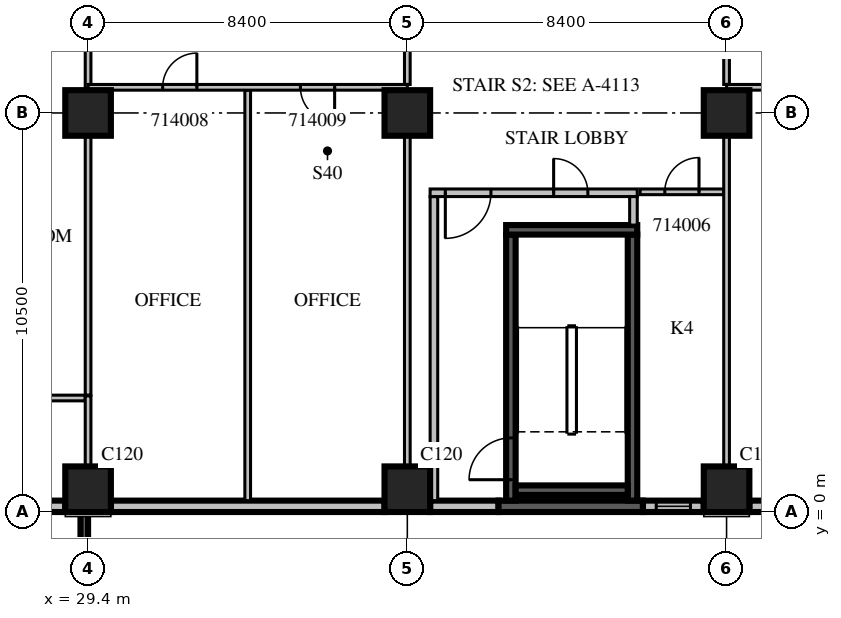
"""IFC4 building model, lengths in metres.
Left out: names, types, materials, properties, quantities, classifications, styles, units other than length and angle.
Written with IfcOpenShell. Run it as: python <this file> out.ifc"""

import sys

from ifc_helpers import new_model, si_unit, direction, frame, frame_2d, origin, origin_2d, place, context, subcontext, project, spatial, rectangle, extrude, source, transform, mapped, element, fill, save


model = new_model("IFC4")
c1 = context("Model", 3, precision=1e-05, world=origin(), true_north=direction((0.0, 1.0)))
c2 = subcontext(c1, "Body", "Model", "MODEL_VIEW")
j1 = project(units=[si_unit("LENGTHUNIT", "METRE"), si_unit("PLANEANGLEUNIT", "RADIAN")], contexts=[c1])
p1 = place(None, origin())
s1 = spatial("IfcSite", under=j1, at=p1, CompositionType="ELEMENT")
p2 = place(p1, origin())
s2 = spatial("IfcBuilding", under=s1, at=p2, CompositionType="ELEMENT")
p3 = place(p2, frame((0.0, 0.0, 69.9)))
s3 = spatial("IfcBuildingStorey", under=s2, at=p3, CompositionType="ELEMENT", Elevation=69.9)
m1 = source(origin(), c2, "Body", "SweptSolid", [
    extrude(rectangle(XDim=1.2, YDim=1.2, at=origin_2d()), origin(), (0.0, 0.0, 1.0), 4.2),
])
for number, where, z_axis, x_axis in (
    (1, (29.4, 0.6, 0.0), (0.0, 0.0, 1.0), (1.0, 0.0, 0.0)),
    (2, (37.8, 0.6, 0.0), (0.0, 0.0, 1.0), (1.0, 0.0, 0.0)),
    (3, (46.2, 0.6, 0.0), (0.0, 0.0, 1.0), (1.0, 0.0, 0.0)),
    (4, (29.4, 10.5, 0.0), (0.0, 0.0, 1.0), (1.0, 0.0, 0.0)),
    (5, (37.8, 10.5, 0.0), (0.0, 0.0, 1.0), (1.0, 0.0, 0.0)),
    (6, (46.2, 10.5, 0.0), (0.0, 0.0, 1.0), (1.0, 0.0, 0.0)),
):
    element("IfcColumn", number, at=place(p3, frame(where, z_axis=z_axis, x_axis=x_axis)), inside=s3, PredefinedType="COLUMN", context=c2, shape_type="MappedRepresentation", body=[
        mapped(m1, transform((0.0, 0.0, 0.0), scale=1.0)),
    ])
m2 = source(origin(), c2, "Body", "SweptSolid", [
    extrude(rectangle(XDim=3.9, YDim=0.2, at=frame_2d((1.95, 0.0))), origin(), (0.0, 0.0, 1.0), 3.8),
])
p4 = place(p3, frame((29.3, 0.0, 0.0), z_axis=(0.0, 0.0, 1.0), x_axis=(0.0, -1.0, 0.0)))
e7 = element("IfcWall", 7, at=p4, inside=s3, PredefinedType="SOLIDWALL", context=c2, shape_type="MappedRepresentation", body=[
    mapped(m2, transform((0.0, 0.0, 0.0), scale=1.0)),
])
m3 = source(origin(), c2, "Body", "SweptSolid", [
    extrude(rectangle(XDim=2.4, YDim=2.7, at=frame_2d((1.2, 1.35))), frame((0.0, 0.11, 0.0), z_axis=(0.0, -1.0, 0.0), x_axis=(1.0, 0.0, 0.0)), (0.0, 0.0, 1.0), 0.22),
])
p5 = place(p4, frame((0.75, 0.0, 0.6)))
e8 = element("IfcOpeningElement", 8, at=p5, cuts=e7, PredefinedType="OPENING", context=c2, shape_type="MappedRepresentation", body=[
    mapped(m3, transform((0.0, 0.0, 0.0), scale=1.0)),
])
m4 = source(origin(), c2, "Body", "SweptSolid", [
    extrude(rectangle(XDim=7.2, YDim=0.3, at=frame_2d((3.6, 0.0))), origin(), (0.0, 0.0, 1.0), 3.8),
])
p6 = place(p3, frame((21.6, 0.15, 0.0), z_axis=(0.0, 0.0, 1.0), x_axis=(1.0, 0.0, 0.0)))
e9 = element("IfcWall", 9, at=p6, inside=s3, PredefinedType="STANDARD", context=c2, shape_type="MappedRepresentation", body=[
    mapped(m4, transform((0.0, 0.0, 0.0), scale=1.0)),
])
m5 = source(origin(), c2, "Body", "SweptSolid", [
    extrude(rectangle(XDim=2.4, YDim=2.7, at=frame_2d((1.2, 1.35))), frame((0.0, 0.16, 0.0), z_axis=(0.0, -1.0, 0.0), x_axis=(1.0, 0.0, 0.0)), (0.0, 0.0, 1.0), 0.32),
])
p7 = place(p6, frame((0.3, 0.0, 0.6)))
e10 = element("IfcOpeningElement", 10, at=p7, cuts=e9, PredefinedType="OPENING", context=c2, shape_type="MappedRepresentation", body=[
    mapped(m5, transform((0.0, 0.0, 0.0), scale=1.0)),
])
m6 = source(origin(), c2, "Body", "SweptSolid", [
    extrude(rectangle(XDim=1.0, YDim=2.1, at=frame_2d((0.5, 1.05))), frame((0.0, 0.16, 0.0), z_axis=(0.0, -1.0, 0.0), x_axis=(1.0, 0.0, 0.0)), (0.0, 0.0, 1.0), 0.32),
])
p8 = place(p6, frame((5.2, 0.0, 0.0)))
e11 = element("IfcOpeningElement", 11, at=p8, cuts=e9, PredefinedType="OPENING", context=c2, shape_type="MappedRepresentation", body=[
    mapped(m6, transform((0.0, 0.0, 0.0), scale=1.0)),
])
p9 = place(p3, frame((30.0, 0.15, 0.0), z_axis=(0.0, 0.0, 1.0), x_axis=(1.0, 0.0, 0.0)))
e12 = element("IfcWall", 12, at=p9, inside=s3, PredefinedType="STANDARD", context=c2, shape_type="MappedRepresentation", body=[
    mapped(m4, transform((0.0, 0.0, 0.0), scale=1.0)),
])
m7 = source(origin(), c2, "Body", "SweptSolid", [
    extrude(rectangle(XDim=1.8, YDim=0.3, at=frame_2d((0.9, 0.0))), origin(), (0.0, 0.0, 1.0), 3.8),
])
p10 = place(p3, frame((38.4, 0.15, 0.0), z_axis=(0.0, 0.0, 1.0), x_axis=(1.0, 0.0, 0.0)))
e13 = element("IfcWall", 13, at=p10, inside=s3, PredefinedType="STANDARD", context=c2, shape_type="MappedRepresentation", body=[
    mapped(m7, transform((0.0, 0.0, 0.0), scale=1.0)),
])
m8 = source(origin(), c2, "Body", "SweptSolid", [
    extrude(rectangle(XDim=3.8, YDim=0.3, at=frame_2d((1.9, 0.0))), origin(), (0.0, 0.0, 1.0), 3.8),
])
p11 = place(p3, frame((40.2, 0.15, 0.0), z_axis=(0.0, 0.0, 1.0), x_axis=(1.0, 0.0, 0.0)))
e14 = element("IfcWall", 14, at=p11, inside=s3, PredefinedType="SOLIDWALL", context=c2, shape_type="MappedRepresentation", body=[
    mapped(m8, transform((0.0, 0.0, 0.0), scale=1.0)),
])
m9 = source(origin(), c2, "Body", "SweptSolid", [
    extrude(rectangle(XDim=1.6, YDim=0.3, at=frame_2d((0.8, 0.0))), origin(), (0.0, 0.0, 1.0), 3.8),
])
p12 = place(p3, frame((44.0, 0.15, 0.0), z_axis=(0.0, 0.0, 1.0), x_axis=(1.0, 0.0, 0.0)))
e15 = element("IfcWall", 15, at=p12, inside=s3, PredefinedType="STANDARD", context=c2, shape_type="MappedRepresentation", body=[
    mapped(m9, transform((0.0, 0.0, 0.0), scale=1.0)),
])
m10 = source(origin(), c2, "Body", "SweptSolid", [
    extrude(rectangle(XDim=0.9, YDim=2.7, at=frame_2d((0.45, 1.35))), frame((0.0, 0.16, 0.0), z_axis=(0.0, -1.0, 0.0), x_axis=(1.0, 0.0, 0.0)), (0.0, 0.0, 1.0), 0.32),
])
p13 = place(p12, frame((0.35, 0.0, 0.6)))
e16 = element("IfcOpeningElement", 16, at=p13, cuts=e15, PredefinedType="OPENING", context=c2, shape_type="MappedRepresentation", body=[
    mapped(m10, transform((0.0, 0.0, 0.0), scale=1.0)),
])
m11 = source(origin(), c2, "Body", "SweptSolid", [
    extrude(rectangle(XDim=4.68, YDim=0.3, at=frame_2d((2.34, 0.0))), origin(), (0.0, 0.0, 1.0), 3.3),
])
p14 = place(p3, frame((46.8, 0.15, 0.0), z_axis=(0.0, 0.0, 1.0), x_axis=(1.0, 0.0, 0.0)))
e17 = element("IfcWall", 17, at=p14, inside=s3, PredefinedType="STANDARD", context=c2, shape_type="MappedRepresentation", body=[
    mapped(m11, transform((0.0, 0.0, 0.0), scale=1.0)),
])
m12 = source(origin(), c2, "Body", "SweptSolid", [
    extrude(rectangle(XDim=3.6, YDim=2.7, at=frame_2d((1.8, 1.35))), frame((0.0, 0.16, 0.0), z_axis=(0.0, -1.0, 0.0), x_axis=(1.0, 0.0, 0.0)), (0.0, 0.0, 1.0), 0.32),
])
p15 = place(p14, frame((0.54, 0.0, 0.6)))
e18 = element("IfcOpeningElement", 18, at=p15, cuts=e17, PredefinedType="OPENING", context=c2, shape_type="MappedRepresentation", body=[
    mapped(m12, transform((0.0, 0.0, 0.0), scale=1.0)),
])
m13 = source(origin(), c2, "Body", "SweptSolid", [
    extrude(rectangle(XDim=7.0, YDim=0.25, at=frame_2d((3.5, 0.0))), origin(), (0.0, 0.0, 1.0), 3.8),
])
p16 = place(p3, frame((40.525, 0.3, 0.0), z_axis=(0.0, 0.0, 1.0), x_axis=(0.0, 1.0, 0.0)))
e19 = element("IfcWall", 19, at=p16, inside=s3, PredefinedType="SOLIDWALL", context=c2, shape_type="MappedRepresentation", body=[
    mapped(m13, transform((0.0, 0.0, 0.0), scale=1.0)),
])
m14 = source(origin(), c2, "Body", "SweptSolid", [
    extrude(rectangle(XDim=1.1, YDim=2.1, at=frame_2d((0.55, 1.05))), frame((0.0, 0.135, 0.0), z_axis=(0.0, -1.0, 0.0), x_axis=(1.0, 0.0, 0.0)), (0.0, 0.0, 1.0), 0.27),
])
p17 = place(p16, frame((0.55, 0.0, 0.0)))
e20 = element("IfcOpeningElement", 20, at=p17, cuts=e19, PredefinedType="OPENING", context=c2, shape_type="MappedRepresentation", body=[
    mapped(m14, transform((0.0, 0.0, 0.0), scale=1.0)),
])
p18 = place(p3, frame((43.725, 0.3, 0.0), z_axis=(0.0, 0.0, 1.0), x_axis=(0.0, 1.0, 0.0)))
e21 = element("IfcWall", 21, at=p18, inside=s3, PredefinedType="SOLIDWALL", context=c2, shape_type="MappedRepresentation", body=[
    mapped(m13, transform((0.0, 0.0, 0.0), scale=1.0)),
])
m15 = source(origin(), c2, "Body", "SweptSolid", [
    extrude(rectangle(XDim=3.45, YDim=0.25, at=frame_2d((1.725, 0.0))), origin(), (0.0, 0.0, 1.0), 3.8),
])
p19 = place(p3, frame((40.4, 7.425, 0.0), z_axis=(0.0, 0.0, 1.0), x_axis=(1.0, 0.0, 0.0)))
e22 = element("IfcWall", 22, at=p19, inside=s3, PredefinedType="SOLIDWALL", context=c2, shape_type="MappedRepresentation", body=[
    mapped(m15, transform((0.0, 0.0, 0.0), scale=1.0)),
])
m16 = source(origin(), c2, "Body", "SweptSolid", [
    extrude(rectangle(XDim=2.95, YDim=0.25, at=frame_2d((1.475, 0.0))), origin(), (0.0, 0.0, 1.0), 3.8),
])
p20 = place(p3, frame((40.65, 0.575, 0.0), z_axis=(0.0, 0.0, 1.0), x_axis=(1.0, 0.0, 0.0)))
e23 = element("IfcWall", 23, at=p20, inside=s3, PredefinedType="SOLIDWALL", context=c2, shape_type="MappedRepresentation", body=[
    mapped(m16, transform((0.0, 0.0, 0.0), scale=1.0)),
])
m17 = source(origin(), c2, "Body", "SweptSolid", [
    extrude(rectangle(XDim=8.0, YDim=0.2, at=frame_2d((4.0, 0.0))), origin(), (0.0, 0.0, 1.0), 3.8),
])
p21 = place(p3, frame((38.5, 0.3, 0.0), z_axis=(0.0, 0.0, 1.0), x_axis=(0.0, 1.0, 0.0)))
e24 = element("IfcWall", 24, at=p21, inside=s3, PredefinedType="PARTITIONING", context=c2, shape_type="MappedRepresentation", body=[
    mapped(m17, transform((0.0, 0.0, 0.0), scale=1.0)),
])
m18 = source(origin(), c2, "Body", "SweptSolid", [
    extrude(rectangle(XDim=5.45, YDim=0.2, at=frame_2d((2.725, 0.0))), origin(), (0.0, 0.0, 1.0), 3.8),
])
p22 = place(p3, frame((38.4, 8.4, 0.0), z_axis=(0.0, 0.0, 1.0), x_axis=(1.0, 0.0, 0.0)))
e25 = element("IfcWall", 25, at=p22, inside=s3, PredefinedType="PARTITIONING", context=c2, shape_type="MappedRepresentation", body=[
    mapped(m18, transform((0.0, 0.0, 0.0), scale=1.0)),
])
m19 = source(origin(), c2, "Body", "SweptSolid", [
    extrude(rectangle(XDim=1.2, YDim=2.1, at=frame_2d((0.6, 1.05))), frame((0.0, 0.11, 0.0), z_axis=(0.0, -1.0, 0.0), x_axis=(1.0, 0.0, 0.0)), (0.0, 0.0, 1.0), 0.22),
])
p23 = place(p22, frame((0.4, 0.0, 0.0)))
e26 = element("IfcOpeningElement", 26, at=p23, cuts=e25, PredefinedType="OPENING", context=c2, shape_type="MappedRepresentation", body=[
    mapped(m19, transform((0.0, 0.0, 0.0), scale=1.0)),
])
m20 = source(origin(), c2, "Body", "SweptSolid", [
    extrude(rectangle(XDim=0.9, YDim=2.1, at=frame_2d((0.45, 1.05))), frame((0.0, 0.11, 0.0), z_axis=(0.0, -1.0, 0.0), x_axis=(1.0, 0.0, 0.0)), (0.0, 0.0, 1.0), 0.22),
])
p24 = place(p22, frame((3.25, 0.0, 0.0)))
e27 = element("IfcOpeningElement", 27, at=p24, cuts=e25, PredefinedType="OPENING", context=c2, shape_type="MappedRepresentation", body=[
    mapped(m20, transform((0.0, 0.0, 0.0), scale=1.0)),
])
m21 = source(origin(), c2, "Body", "SweptSolid", [
    extrude(rectangle(XDim=0.75, YDim=0.2, at=frame_2d((0.375, 0.0))), origin(), (0.0, 0.0, 1.0), 3.8),
])
p25 = place(p3, frame((43.75, 7.55, 0.0), z_axis=(0.0, 0.0, 1.0), x_axis=(0.0, 1.0, 0.0)))
e28 = element("IfcWall", 28, at=p25, inside=s3, PredefinedType="PARTITIONING", context=c2, shape_type="MappedRepresentation", body=[
    mapped(m21, transform((0.0, 0.0, 0.0), scale=1.0)),
])
m22 = source(origin(), c2, "Body", "SweptSolid", [
    extrude(rectangle(XDim=6.826, YDim=0.15, at=frame_2d((3.413, 0.0))), origin(), (0.0, 0.0, 1.0), 3.8),
])
p26 = place(p3, frame((29.4, 3.075, 0.0), z_axis=(0.0, 0.0, 1.0), x_axis=(0.0, 1.0, 0.0)))
e29 = element("IfcWall", 29, at=p26, inside=s3, PredefinedType="PARTITIONING", context=c2, shape_type="MappedRepresentation", body=[
    mapped(m22, transform((0.0, 0.0, 0.0), scale=1.0)),
])
m23 = source(origin(), c2, "Body", "SweptSolid", [
    extrude(rectangle(XDim=3.901, YDim=0.15, at=frame_2d((1.95, 0.0))), origin(), (0.0, 0.0, 1.0), 3.8),
])
p27 = place(p3, frame((29.4, 11.099, 0.0), z_axis=(0.0, 0.0, 1.0), x_axis=(0.0, 1.0, 0.0)))
e30 = element("IfcWall", 30, at=p27, inside=s3, PredefinedType="PARTITIONING", context=c2, shape_type="MappedRepresentation", body=[
    mapped(m23, transform((0.0, 0.0, 0.0), scale=1.0)),
])
m24 = source(origin(), c2, "Body", "SweptSolid", [
    extrude(rectangle(XDim=7.125, YDim=0.15, at=frame_2d((3.562, 0.0))), origin(), (0.0, 0.0, 1.0), 3.8),
])
p28 = place(p3, frame((22.2, 3.0, 0.0), z_axis=(0.0, 0.0, 1.0), x_axis=(1.0, 0.0, 0.0)))
e31 = element("IfcWall", 31, at=p28, inside=s3, PredefinedType="PARTITIONING", context=c2, shape_type="MappedRepresentation", body=[
    mapped(m24, transform((0.0, 0.0, 0.0), scale=1.0)),
])
m25 = source(origin(), c2, "Body", "SweptSolid", [
    extrude(rectangle(XDim=1.0, YDim=2.1, at=frame_2d((0.5, 1.05))), frame((0.0, 0.085, 0.0), z_axis=(0.0, -1.0, 0.0), x_axis=(1.0, 0.0, 0.0)), (0.0, 0.0, 1.0), 0.17),
])
p29 = place(p28, frame((3.1, 0.0, 0.0)))
e32 = element("IfcOpeningElement", 32, at=p29, cuts=e31, PredefinedType="OPENING", context=c2, shape_type="MappedRepresentation", body=[
    mapped(m25, transform((0.0, 0.0, 0.0), scale=1.0)),
])
m26 = source(origin(), c2, "Body", "SweptSolid", [
    extrude(rectangle(XDim=0.9, YDim=2.1, at=frame_2d((0.45, 1.05))), frame((0.0, 0.085, 0.0), z_axis=(0.0, -1.0, 0.0), x_axis=(1.0, 0.0, 0.0)), (0.0, 0.0, 1.0), 0.17),
])
p30 = place(p28, frame((4.162, 0.0, 0.0)))
e33 = element("IfcOpeningElement", 33, at=p30, cuts=e31, PredefinedType="OPENING", context=c2, shape_type="MappedRepresentation", body=[
    mapped(m26, transform((0.0, 0.0, 0.0), scale=1.0)),
])
m27 = source(origin(), c2, "Body", "SweptSolid", [
    extrude(rectangle(XDim=2.2, YDim=0.15, at=frame_2d((1.1, 0.0))), origin(), (0.0, 0.0, 1.0), 3.8),
])
p31 = place(p3, frame((46.125, 8.425, 0.0), z_axis=(0.0, 0.0, 1.0), x_axis=(-1.0, 0.0, 0.0)))
e34 = element("IfcWall", 34, at=p31, inside=s3, PredefinedType="PARTITIONING", context=c2, shape_type="MappedRepresentation", body=[
    mapped(m27, transform((0.0, 0.0, 0.0), scale=1.0)),
])
p32 = place(p31, frame((0.65, 0.0, 0.0)))
e35 = element("IfcOpeningElement", 35, at=p32, cuts=e34, PredefinedType="OPENING", context=c2, shape_type="MappedRepresentation", body=[
    mapped(m26, transform((0.0, 0.0, 0.0), scale=1.0)),
])
m28 = source(origin(), c2, "Body", "SweptSolid", [
    extrude(rectangle(XDim=10.8, YDim=0.15, at=frame_2d((5.4, 0.0))), origin(), (0.0, 0.0, 1.0), 3.8),
])
p33 = place(p3, frame((33.6, 0.3, 0.0), z_axis=(0.0, 0.0, 1.0), x_axis=(0.0, 1.0, 0.0)))
e36 = element("IfcWall", 36, at=p33, inside=s3, PredefinedType="PARTITIONING", context=c2, shape_type="MappedRepresentation", body=[
    mapped(m28, transform((0.0, 0.0, 0.0), scale=1.0)),
])
m29 = source(origin(), c2, "Body", "SweptSolid", [
    extrude(rectangle(XDim=1.856, YDim=0.15, at=frame_2d((0.928, 0.0))), origin(), (0.0, 0.0, 1.0), 3.8),
])
p34 = place(p3, frame((29.4, 1.199, 0.0), z_axis=(0.0, 0.0, 1.0), x_axis=(0.0, 1.0, 0.0)))
e37 = element("IfcWall", 37, at=p34, inside=s3, PredefinedType="PARTITIONING", context=c2, shape_type="MappedRepresentation", body=[
    mapped(m29, transform((0.0, 0.0, 0.0), scale=1.0)),
])
m30 = source(origin(), c2, "Body", "SweptSolid", [
    extrude(rectangle(XDim=8.702, YDim=0.15, at=frame_2d((4.351, 0.0))), origin(), (0.0, 0.0, 1.0), 3.8),
])
p35 = place(p3, frame((37.8, 1.199, 0.0), z_axis=(0.0, 0.0, 1.0), x_axis=(0.0, 1.0, 0.0)))
e38 = element("IfcWall", 38, at=p35, inside=s3, PredefinedType="PARTITIONING", context=c2, shape_type="MappedRepresentation", body=[
    mapped(m30, transform((0.0, 0.0, 0.0), scale=1.0)),
])
m31 = source(origin(), c2, "Body", "SweptSolid", [
    extrude(rectangle(XDim=3.75, YDim=0.15, at=frame_2d((1.875, 0.0))), origin(), (0.0, 0.0, 1.0), 3.8),
])
p36 = place(p3, frame((37.8, 11.25, 0.0), z_axis=(0.0, 0.0, 1.0), x_axis=(0.0, 1.0, 0.0)))
e39 = element("IfcWall", 39, at=p36, inside=s3, PredefinedType="PARTITIONING", context=c2, shape_type="MappedRepresentation", body=[
    mapped(m31, transform((0.0, 0.0, 0.0), scale=1.0)),
])
m32 = source(origin(), c2, "Body", "SweptSolid", [
    extrude(rectangle(XDim=8.4, YDim=0.15, at=frame_2d((4.2, 0.0))), origin(), (0.0, 0.0, 1.0), 3.8),
])
p37 = place(p3, frame((37.8, 11.175, 0.0), z_axis=(0.0, 0.0, 1.0), x_axis=(-1.0, 0.0, 0.0)))
e40 = element("IfcWall", 40, at=p37, inside=s3, PredefinedType="PARTITIONING", context=c2, shape_type="MappedRepresentation", body=[
    mapped(m32, transform((0.0, 0.0, 0.0), scale=1.0)),
])
p38 = place(p37, frame((5.537, 0.0, 0.0)))
e41 = element("IfcOpeningElement", 41, at=p38, cuts=e40, PredefinedType="OPENING", context=c2, shape_type="MappedRepresentation", body=[
    mapped(m26, transform((0.0, 0.0, 0.0), scale=1.0)),
])
p39 = place(p37, frame((1.913, 0.0, 0.0)))
e42 = element("IfcOpeningElement", 42, at=p39, cuts=e40, PredefinedType="OPENING", context=c2, shape_type="MappedRepresentation", body=[
    mapped(m26, transform((0.0, 0.0, 0.0), scale=1.0)),
])
p40 = place(p3, frame((46.2, 1.199, 0.0), z_axis=(0.0, 0.0, 1.0), x_axis=(0.0, 1.0, 0.0)))
e43 = element("IfcWall", 43, at=p40, inside=s3, PredefinedType="PARTITIONING", context=c2, shape_type="MappedRepresentation", body=[
    mapped(m30, transform((0.0, 0.0, 0.0), scale=1.0)),
])
p41 = place(p3, frame((46.2, 11.25, 0.0), z_axis=(0.0, 0.0, 1.0), x_axis=(0.0, 1.0, 0.0)))
e44 = element("IfcWall", 44, at=p41, inside=s3, PredefinedType="PARTITIONING", context=c2, shape_type="MappedRepresentation", body=[
    mapped(m31, transform((0.0, 0.0, 0.0), scale=1.0)),
])
m33 = source(origin(), c2, "Body", "SweptSolid", [
    extrude(rectangle(XDim=24.9, YDim=0.15, at=frame_2d((12.45, 0.0))), origin(), (0.0, 0.0, 1.0), 3.3),
])
p42 = place(p3, frame((71.1, 11.175, 0.0), z_axis=(0.0, 0.0, 1.0), x_axis=(-1.0, 0.0, 0.0)))
e45 = element("IfcWall", 45, at=p42, inside=s3, PredefinedType="PARTITIONING", context=c2, shape_type="MappedRepresentation", body=[
    mapped(m33, transform((0.0, 0.0, 0.0), scale=1.0)),
])
m34 = source(origin(), c2, "Body", "SweptSolid", [
    extrude(rectangle(XDim=1.1, YDim=2.1, at=frame_2d((0.55, 1.05))), frame((0.0, 0.085, 0.0), z_axis=(0.0, -1.0, 0.0), x_axis=(1.0, 0.0, 0.0)), (0.0, 0.0, 1.0), 0.17),
])
p43 = place(p42, frame((20.017, 0.0, 0.0)))
e46 = element("IfcOpeningElement", 46, at=p43, cuts=e45, PredefinedType="OPENING", context=c2, shape_type="MappedRepresentation", body=[
    mapped(m34, transform((0.0, 0.0, 0.0), scale=1.0)),
])
p44 = place(p42, frame((16.481, 0.0, 0.0)))
e47 = element("IfcOpeningElement", 47, at=p44, cuts=e45, PredefinedType="OPENING", context=c2, shape_type="MappedRepresentation", body=[
    mapped(m34, transform((0.0, 0.0, 0.0), scale=1.0)),
])
p45 = place(p42, frame((4.607, 0.0, 0.0)))
e48 = element("IfcOpeningElement", 48, at=p45, cuts=e45, PredefinedType="OPENING", context=c2, shape_type="MappedRepresentation", body=[
    mapped(m26, transform((0.0, 0.0, 0.0), scale=1.0)),
])
p46 = place(p42, frame((2.243, 0.0, 0.0)))
e49 = element("IfcOpeningElement", 49, at=p46, cuts=e45, PredefinedType="OPENING", context=c2, shape_type="MappedRepresentation", body=[
    mapped(m26, transform((0.0, 0.0, 0.0), scale=1.0)),
])
m35 = source(origin(), c2, "Body", "SweptSolid", [
    extrude(rectangle(XDim=0.9, YDim=2.7, at=frame_2d((0.45, 1.35))), frame((0.0, 0.03, 0.0), z_axis=(0.0, -1.0, 0.0), x_axis=(1.0, 0.0, 0.0)), (0.0, 0.0, 1.0), 0.06),
])
p47 = place(p13, origin())
e50 = element("IfcWindow", 50, at=p47, inside=s3, PartitioningType="SINGLE_PANEL", PredefinedType="WINDOW", context=c2, shape_type="MappedRepresentation", body=[
    mapped(m35, transform((0.0, 0.0, 0.0), scale=1.0)),
])
fill(e16, e50)
m36 = source(origin(), c2, "Body", "SweptSolid", [
    extrude(rectangle(XDim=1.1, YDim=2.1, at=frame_2d((0.55, 1.05))), frame((0.0, 0.025, 0.0), z_axis=(0.0, -1.0, 0.0), x_axis=(1.0, 0.0, 0.0)), (0.0, 0.0, 1.0), 0.05),
])
p48 = place(p17, origin())
e51 = element("IfcDoor", 51, at=p48, inside=s3, OperationType="SINGLE_SWING_LEFT", PredefinedType="DOOR", context=c2, shape_type="MappedRepresentation", body=[
    mapped(m36, transform((0.0, 0.0, 0.0), scale=1.0)),
])
fill(e20, e51)
m37 = source(origin(), c2, "Body", "SweptSolid", [
    extrude(rectangle(XDim=1.2, YDim=2.1, at=frame_2d((0.6, 1.05))), frame((0.0, 0.025, 0.0), z_axis=(0.0, -1.0, 0.0), x_axis=(1.0, 0.0, 0.0)), (0.0, 0.0, 1.0), 0.05),
])
p49 = place(p23, origin())
e52 = element("IfcDoor", 52, at=p49, inside=s3, OperationType="SINGLE_SWING_RIGHT", PredefinedType="DOOR", context=c2, shape_type="MappedRepresentation", body=[
    mapped(m37, transform((0.0, 0.0, 0.0), scale=1.0)),
])
fill(e26, e52)
m38 = source(origin(), c2, "Body", "SweptSolid", [
    extrude(rectangle(XDim=0.9, YDim=2.1, at=frame_2d((0.45, 1.05))), frame((0.0, 0.025, 0.0), z_axis=(0.0, -1.0, 0.0), x_axis=(1.0, 0.0, 0.0)), (0.0, 0.0, 1.0), 0.05),
])
p50 = place(p24, origin())
e53 = element("IfcDoor", 53, at=p50, inside=s3, OperationType="SINGLE_SWING_LEFT", PredefinedType="DOOR", context=c2, shape_type="MappedRepresentation", body=[
    mapped(m38, transform((0.0, 0.0, 0.0), scale=1.0)),
])
fill(e27, e53)
p51 = place(p32, origin())
e54 = element("IfcDoor", 54, at=p51, inside=s3, OperationType="SINGLE_SWING_RIGHT", PredefinedType="DOOR", context=c2, shape_type="MappedRepresentation", body=[
    mapped(m38, transform((0.0, 0.0, 0.0), scale=1.0)),
])
fill(e35, e54)
p52 = place(p38, origin())
e55 = element("IfcDoor", 55, at=p52, inside=s3, OperationType="SINGLE_SWING_RIGHT", PredefinedType="DOOR", context=c2, shape_type="MappedRepresentation", body=[
    mapped(m38, transform((0.0, 0.0, 0.0), scale=1.0)),
])
fill(e41, e55)
p53 = place(p39, origin())
e56 = element("IfcDoor", 56, at=p53, inside=s3, OperationType="SINGLE_SWING_LEFT", PredefinedType="DOOR", context=c2, shape_type="MappedRepresentation", body=[
    mapped(m38, transform((0.0, 0.0, 0.0), scale=1.0)),
])
fill(e42, e56)
save(model, sys.argv[1])
